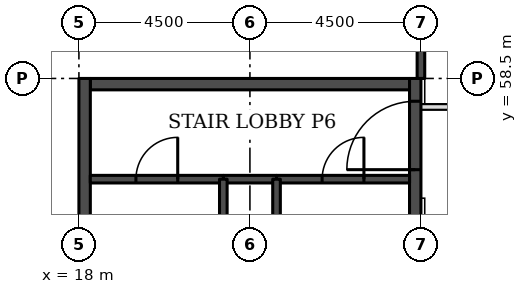
"""IFC4 building model, lengths in metres.
Left out: names, types, materials, properties, quantities, classifications, styles, units other than length and angle.
Written with IfcOpenShell. Run it as: python <this file> out.ifc"""

import sys

from ifc_helpers import new_model, si_unit, direction, frame, frame_2d, origin, place, context, subcontext, project, spatial, rectangle, extrude, element, fill, save


model = new_model("IFC4")
c1 = context("Model", 3, precision=1e-05, world=origin(), true_north=direction((0.0, 1.0)))
c2 = subcontext(c1, "Body", "Model", "MODEL_VIEW")
j1 = project(units=[si_unit("LENGTHUNIT", "METRE"), si_unit("PLANEANGLEUNIT", "RADIAN")], contexts=[c1])
p1 = place(None, origin())
s1 = spatial("IfcSite", under=j1, at=p1, CompositionType="ELEMENT")
p2 = place(p1, origin())
s2 = spatial("IfcBuilding", under=s1, at=p2, CompositionType="ELEMENT")
p3 = place(p2, frame((0.0, 0.0, 39.6)))
s3 = spatial("IfcBuildingStorey", under=s2, at=p3, CompositionType="ELEMENT", Elevation=39.6)
p4 = place(p3, frame((18.3, 58.35, 0.0), z_axis=(0.0, 0.0, 1.0), x_axis=(1.0, 0.0, 0.0)))
e1 = element("IfcWall", 1, at=p4, inside=s3, PredefinedType="SHEAR", context=c2, shape_type="SweptSolid", body=[
    extrude(rectangle(XDim=8.4, YDim=0.3, at=frame_2d((4.2, 0.0))), origin(), (0.0, 0.0, 1.0), 3.3),
])
p5 = place(p3, frame((18.15, 49.5, 0.0), z_axis=(0.0, 0.0, 1.0), x_axis=(0.0, 1.0, 0.0)))
e2 = element("IfcWall", 2, at=p5, inside=s3, PredefinedType="SHEAR", context=c2, shape_type="SweptSolid", body=[
    extrude(rectangle(XDim=9.0, YDim=0.3, at=frame_2d((4.5, 0.0))), origin(), (0.0, 0.0, 1.0), 3.3),
])
p6 = place(p3, frame((26.85, 49.5, 0.0), z_axis=(0.0, 0.0, 1.0), x_axis=(0.0, 1.0, 0.0)))
e3 = element("IfcWall", 3, at=p6, inside=s3, PredefinedType="SHEAR", context=c2, shape_type="SweptSolid", body=[
    extrude(rectangle(XDim=9.0, YDim=0.3, at=frame_2d((4.5, 0.0))), origin(), (0.0, 0.0, 1.0), 3.3),
])
p7 = place(p6, frame((6.6, 0.0, 0.0)))
e4 = element("IfcOpeningElement", 4, at=p7, cuts=e3, PredefinedType="OPENING", context=c2, shape_type="SweptSolid", body=[
    extrude(rectangle(XDim=1.8, YDim=2.1, at=frame_2d((0.9, 1.05))), frame((0.0, 0.16, 0.0), z_axis=(0.0, -1.0, 0.0), x_axis=(1.0, 0.0, 0.0)), (0.0, 0.0, 1.0), 0.32),
])
p8 = place(p3, frame((17.73, 63.826, 0.0), z_axis=(0.0, 0.0, 1.0), x_axis=(-0.707106781187, -0.707106781187, 0.0)))
e5 = element("IfcWall", 5, at=p8, inside=s3, PredefinedType="STANDARD", context=c2, shape_type="SweptSolid", body=[
    extrude(rectangle(XDim=7.151, YDim=0.35, at=frame_2d((3.576, 0.0))), origin(), (0.0, 0.0, 1.0), 3.055),
])
p9 = place(p8, frame((1.926, 0.0, 0.8)))
e6 = element("IfcOpeningElement", 6, at=p9, cuts=e5, PredefinedType="OPENING", context=c2, shape_type="SweptSolid", body=[
    extrude(rectangle(XDim=3.3, YDim=1.5, at=frame_2d((1.65, 0.75))), frame((0.0, 0.185, 0.0), z_axis=(0.0, -1.0, 0.0), x_axis=(1.0, 0.0, 0.0)), (0.0, 0.0, 1.0), 0.37),
])
p10 = place(p3, frame((27.0, 58.5, 0.0), z_axis=(0.0, 0.0, 1.0), x_axis=(0.0, 1.0, 0.0)))
e7 = element("IfcWall", 7, at=p10, inside=s3, PredefinedType="SOLIDWALL", context=c2, shape_type="SweptSolid", body=[
    extrude(rectangle(XDim=3.9, YDim=0.2, at=frame_2d((1.95, 0.0))), origin(), (0.0, 0.0, 1.0), 3.08),
])
p11 = place(p3, frame((27.0, 57.75, 0.0), z_axis=(0.0, 0.0, 1.0), x_axis=(1.0, 0.0, 0.0)))
e8 = element("IfcWall", 8, at=p11, inside=s3, PredefinedType="PARTITIONING", context=c2, shape_type="SweptSolid", body=[
    extrude(rectangle(XDim=2.48, YDim=0.15, at=frame_2d((1.24, 0.0))), origin(), (0.0, 0.0, 1.0), 3.08),
])
p12 = place(p11, frame((0.875, 0.0, 0.0)))
e9 = element("IfcOpeningElement", 9, at=p12, cuts=e8, PredefinedType="OPENING", context=c2, shape_type="SweptSolid", body=[
    extrude(rectangle(XDim=1.0, YDim=2.1, at=frame_2d((0.5, 1.05))), frame((0.0, 0.085, 0.0), z_axis=(0.0, -1.0, 0.0), x_axis=(1.0, 0.0, 0.0)), (0.0, 0.0, 1.0), 0.17),
])
p13 = place(p3, frame((21.8, 55.85, 0.0), z_axis=(0.0, 0.0, 1.0), x_axis=(1.0, 0.0, 0.0)))
e10 = element("IfcWall", 10, at=p13, inside=s3, PredefinedType="SOLIDWALL", context=c2, shape_type="SweptSolid", body=[
    extrude(rectangle(XDim=1.4, YDim=0.2, at=frame_2d((0.7, 0.0))), origin(), (0.0, 0.0, 1.0), 3.08),
])
p14 = place(p3, frame((18.3, 55.85, 0.0), z_axis=(0.0, 0.0, 1.0), x_axis=(1.0, 0.0, 0.0)))
e11 = element("IfcWall", 11, at=p14, inside=s3, PredefinedType="SOLIDWALL", context=c2, shape_type="SweptSolid", body=[
    extrude(rectangle(XDim=3.5, YDim=0.2, at=frame_2d((1.75, 0.0))), origin(), (0.0, 0.0, 1.0), 3.08),
])
p15 = place(p14, frame((1.2, 0.0, 0.0)))
e12 = element("IfcOpeningElement", 12, at=p15, cuts=e11, PredefinedType="OPENING", context=c2, shape_type="SweptSolid", body=[
    extrude(rectangle(XDim=1.1, YDim=2.1, at=frame_2d((0.55, 1.05))), frame((0.0, 0.11, 0.0), z_axis=(0.0, -1.0, 0.0), x_axis=(1.0, 0.0, 0.0)), (0.0, 0.0, 1.0), 0.22),
])
p16 = place(p3, frame((23.2, 55.85, 0.0), z_axis=(0.0, 0.0, 1.0), x_axis=(1.0, 0.0, 0.0)))
e13 = element("IfcWall", 13, at=p16, inside=s3, PredefinedType="SOLIDWALL", context=c2, shape_type="SweptSolid", body=[
    extrude(rectangle(XDim=3.5, YDim=0.2, at=frame_2d((1.75, 0.0))), origin(), (0.0, 0.0, 1.0), 3.08),
])
p17 = place(p16, frame((1.2, 0.0, 0.0)))
e14 = element("IfcOpeningElement", 14, at=p17, cuts=e13, PredefinedType="OPENING", context=c2, shape_type="SweptSolid", body=[
    extrude(rectangle(XDim=1.1, YDim=2.1, at=frame_2d((0.55, 1.05))), frame((0.0, 0.11, 0.0), z_axis=(0.0, -1.0, 0.0), x_axis=(1.0, 0.0, 0.0)), (0.0, 0.0, 1.0), 0.22),
])
for number, where, z_axis, x_axis in (
    (15, (21.8, 49.8, 0.0), (0.0, 0.0, 1.0), (0.0, 1.0, 0.0)),
    (16, (23.2, 49.8, 0.0), (0.0, 0.0, 1.0), (0.0, 1.0, 0.0)),
):
    element("IfcWall", number, at=place(p3, frame(where, z_axis=z_axis, x_axis=x_axis)), inside=s3, PredefinedType="SOLIDWALL", context=c2, shape_type="SweptSolid", body=[
        extrude(rectangle(XDim=6.05, YDim=0.2, at=frame_2d((3.025, 0.0))), origin(), (0.0, 0.0, 1.0), 3.08),
    ])
p18 = place(p15, origin())
e17 = element("IfcDoor", 17, at=p18, inside=s3, OperationType="SINGLE_SWING_RIGHT", PredefinedType="DOOR", context=c2, shape_type="SweptSolid", body=[
    extrude(rectangle(XDim=1.1, YDim=2.1, at=frame_2d((0.55, 1.05))), frame((0.0, 0.025, 0.0), z_axis=(0.0, -1.0, 0.0), x_axis=(1.0, 0.0, 0.0)), (0.0, 0.0, 1.0), 0.05),
])
fill(e12, e17)
p19 = place(p17, origin())
e18 = element("IfcDoor", 18, at=p19, inside=s3, OperationType="SINGLE_SWING_RIGHT", PredefinedType="DOOR", context=c2, shape_type="SweptSolid", body=[
    extrude(rectangle(XDim=1.1, YDim=2.1, at=frame_2d((0.55, 1.05))), frame((0.0, 0.025, 0.0), z_axis=(0.0, -1.0, 0.0), x_axis=(1.0, 0.0, 0.0)), (0.0, 0.0, 1.0), 0.05),
])
fill(e14, e18)
p20 = place(p7, origin())
e19 = element("IfcDoor", 19, at=p20, inside=s3, OperationType="SINGLE_SWING_LEFT", PredefinedType="DOOR", context=c2, shape_type="SweptSolid", body=[
    extrude(rectangle(XDim=1.8, YDim=2.1, at=frame_2d((0.9, 1.05))), frame((0.0, 0.025, 0.0), z_axis=(0.0, -1.0, 0.0), x_axis=(1.0, 0.0, 0.0)), (0.0, 0.0, 1.0), 0.05),
])
fill(e4, e19)
save(model, sys.argv[1])
